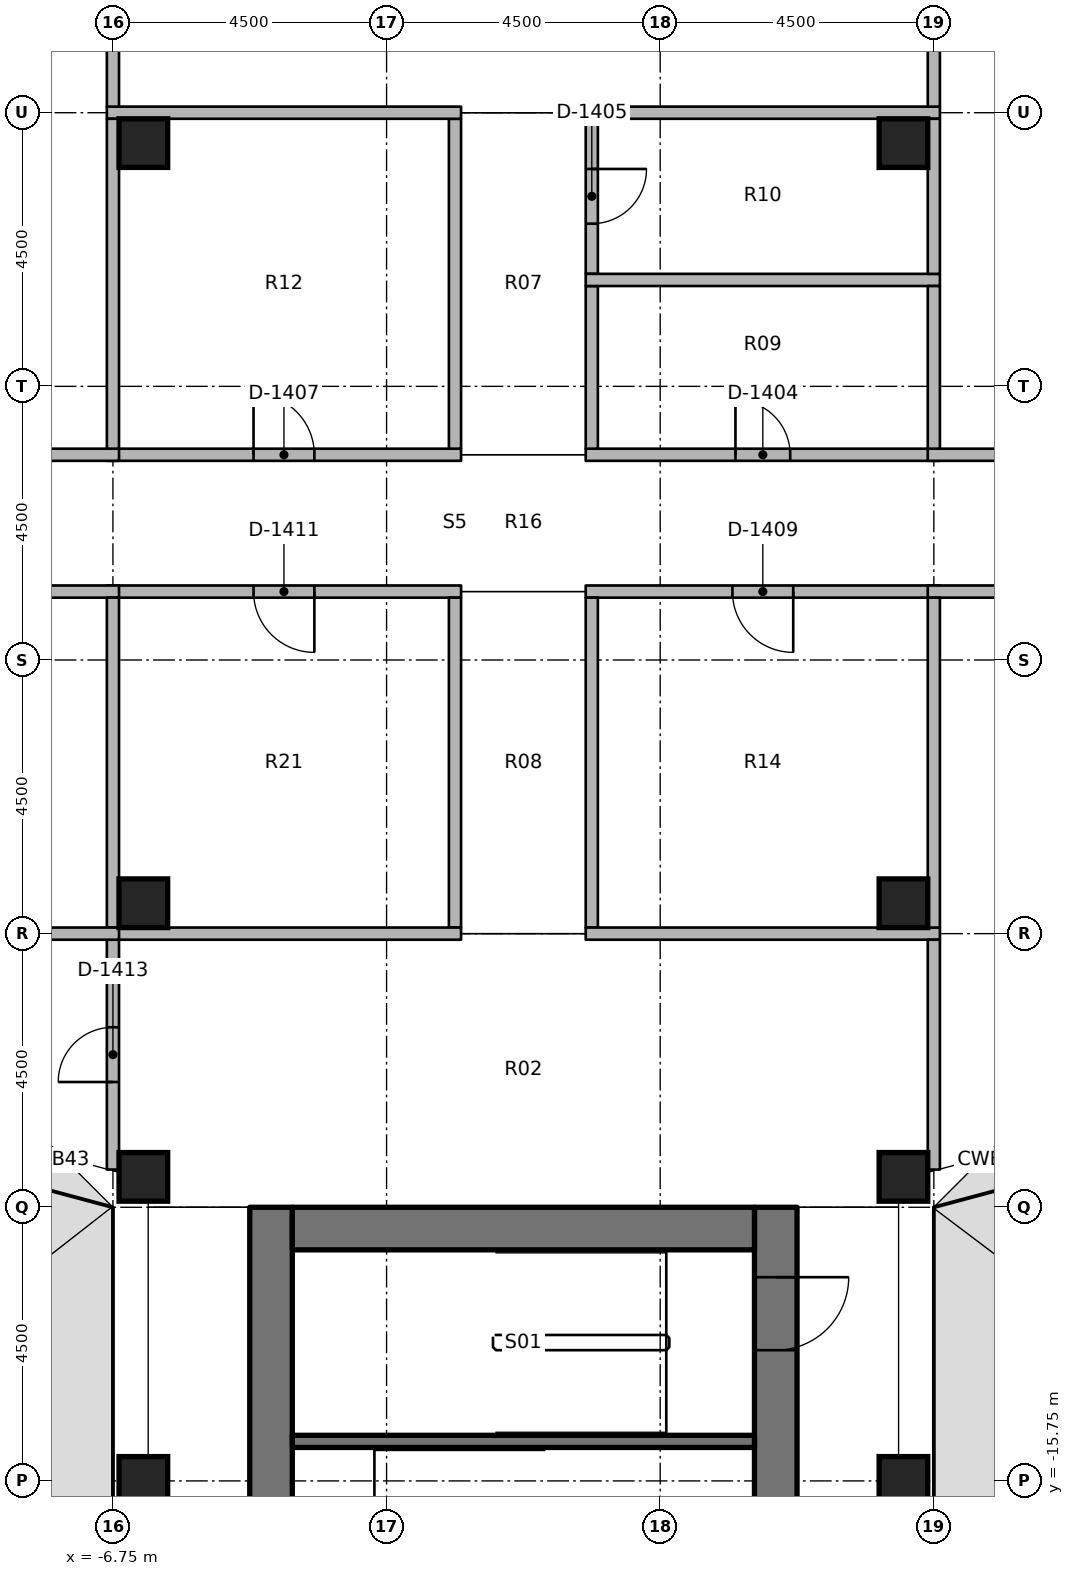
"""IFC4 building model, lengths in metres.
Left out: names, types, materials, properties, quantities, classifications, styles, units other than length and angle.
Written with IfcOpenShell. Run it as: python <this file> out.ifc"""

import sys

from ifc_helpers import new_model, si_unit, direction, frame, frame_2d, origin, origin_2d, place, context, subcontext, project, spatial, rectangle, extrude, element, fill, save


model = new_model("IFC4")
c1 = context("Model", 3, precision=1e-05, world=origin(), true_north=direction((0.0, 1.0)))
c2 = subcontext(c1, "Body", "Model", "MODEL_VIEW")
j1 = project(units=[si_unit("LENGTHUNIT", "METRE"), si_unit("PLANEANGLEUNIT", "RADIAN")], contexts=[c1])
p1 = place(None, origin())
s1 = spatial("IfcSite", under=j1, at=p1, CompositionType="ELEMENT")
p2 = place(p1, origin())
s2 = spatial("IfcBuilding", under=s1, at=p2, CompositionType="ELEMENT")
p3 = place(p2, frame((0.0, 0.0, 141.0)))
s3 = spatial("IfcBuildingStorey", under=s2, at=p3, CompositionType="ELEMENT", Elevation=141.0)
for number, where, z_axis, x_axis in (
    (1, (-6.25, -15.75, 0.0), (0.0, 0.0, 1.0), (1.0, 0.0, 0.0)),
    (2, (-6.25, -10.75, 0.0), (0.0, 0.0, 1.0), (1.0, 0.0, 0.0)),
    (3, (-6.25, -6.25, 0.0), (0.0, 0.0, 1.0), (1.0, 0.0, 0.0)),
    (4, (-6.25, 6.25, 0.0), (0.0, 0.0, 1.0), (1.0, 0.0, 0.0)),
    (5, (6.25, -15.75, 0.0), (0.0, 0.0, 1.0), (1.0, 0.0, 0.0)),
    (6, (6.25, -10.75, 0.0), (0.0, 0.0, 1.0), (1.0, 0.0, 0.0)),
    (7, (6.25, -6.25, 0.0), (0.0, 0.0, 1.0), (1.0, 0.0, 0.0)),
    (8, (6.25, 6.25, 0.0), (0.0, 0.0, 1.0), (1.0, 0.0, 0.0)),
):
    element("IfcColumn", number, at=place(p3, frame(where, z_axis=z_axis, x_axis=x_axis)), inside=s3, PredefinedType="COLUMN", context=c2, shape_type="SweptSolid", body=[
        extrude(rectangle(XDim=0.8, YDim=0.8, at=origin_2d()), origin(), (0.0, 0.0, 1.0), 3.65),
    ])
p4 = place(p3, frame((-4.15, -11.25, 0.0), z_axis=(0.0, 0.0, 1.0), x_axis=(0.0, -1.0, 0.0)))
e9 = element("IfcWall", 9, at=p4, inside=s3, PredefinedType="SHEAR", context=c2, shape_type="SweptSolid", body=[
    extrude(rectangle(XDim=15.0, YDim=0.7, at=frame_2d((7.5, 0.0))), origin(), (0.0, 0.0, 1.0), 3.8),
])
p5 = place(p4, frame((7.15, 0.0, 0.0)))
e10 = element("IfcOpeningElement", 10, at=p5, cuts=e9, PredefinedType="OPENING", context=c2, shape_type="SweptSolid", body=[
    extrude(rectangle(XDim=1.5, YDim=2.3, at=frame_2d((0.75, 1.15))), frame((0.0, 0.36, 0.0), z_axis=(0.0, -1.0, 0.0), x_axis=(1.0, 0.0, 0.0)), (0.0, 0.0, 1.0), 0.72),
])
p6 = place(p4, frame((5.55, 0.0, 0.0)))
e11 = element("IfcOpeningElement", 11, at=p6, cuts=e9, PredefinedType="OPENING", context=c2, shape_type="SweptSolid", body=[
    extrude(rectangle(XDim=1.2, YDim=2.1, at=frame_2d((0.6, 1.05))), frame((0.0, 0.36, 0.0), z_axis=(0.0, -1.0, 0.0), x_axis=(1.0, 0.0, 0.0)), (0.0, 0.0, 1.0), 0.72),
])
p7 = place(p3, frame((4.15, -11.25, 0.0), z_axis=(0.0, 0.0, 1.0), x_axis=(0.0, -1.0, 0.0)))
e12 = element("IfcWall", 12, at=p7, inside=s3, PredefinedType="SHEAR", context=c2, shape_type="SweptSolid", body=[
    extrude(rectangle(XDim=15.0, YDim=0.7, at=frame_2d((7.5, 0.0))), origin(), (0.0, 0.0, 1.0), 3.8),
])
p8 = place(p7, frame((7.15, 0.0, 0.0)))
e13 = element("IfcOpeningElement", 13, at=p8, cuts=e12, PredefinedType="OPENING", context=c2, shape_type="SweptSolid", body=[
    extrude(rectangle(XDim=1.5, YDim=2.3, at=frame_2d((0.75, 1.15))), frame((0.0, 0.36, 0.0), z_axis=(0.0, -1.0, 0.0), x_axis=(1.0, 0.0, 0.0)), (0.0, 0.0, 1.0), 0.72),
])
p9 = place(p7, frame((13.9, 0.0, 0.0)))
e14 = element("IfcOpeningElement", 14, at=p9, cuts=e12, PredefinedType="OPENING", context=c2, shape_type="SweptSolid", body=[
    extrude(rectangle(XDim=0.9, YDim=2.1, at=frame_2d((0.45, 1.05))), frame((0.0, 0.36, 0.0), z_axis=(0.0, -1.0, 0.0), x_axis=(1.0, 0.0, 0.0)), (0.0, 0.0, 1.0), 0.72),
])
p10 = place(p7, frame((1.15, 0.0, 0.0)))
e15 = element("IfcOpeningElement", 15, at=p10, cuts=e12, PredefinedType="OPENING", context=c2, shape_type="SweptSolid", body=[
    extrude(rectangle(XDim=1.2, YDim=2.1, at=frame_2d((0.6, 1.05))), frame((0.0, 0.36, 0.0), z_axis=(0.0, -1.0, 0.0), x_axis=(1.0, 0.0, 0.0)), (0.0, 0.0, 1.0), 0.72),
])
p11 = place(p3, frame((-3.8, -11.6, 0.0), z_axis=(0.0, 0.0, 1.0), x_axis=(1.0, 0.0, 0.0)))
e16 = element("IfcWall", 16, at=p11, inside=s3, PredefinedType="SHEAR", context=c2, shape_type="SweptSolid", body=[
    extrude(rectangle(XDim=7.6, YDim=0.7, at=frame_2d((3.8, 0.0))), origin(), (0.0, 0.0, 1.0), 3.8),
])
p12 = place(p3, frame((3.8, -15.1, 0.0), z_axis=(0.0, 0.0, 1.0), x_axis=(-1.0, 0.0, 0.0)))
e17 = element("IfcWall", 17, at=p12, inside=s3, PredefinedType="SHEAR", context=c2, shape_type="SweptSolid", body=[
    extrude(rectangle(XDim=7.6, YDim=0.2, at=frame_2d((3.8, 0.0))), origin(), (0.0, 0.0, 1.0), 3.65),
])
p13 = place(p3, frame((1.025, 1.125, 0.0), z_axis=(0.0, 0.0, 1.0), x_axis=(1.0, 0.0, 0.0)))
e18 = element("IfcWall", 18, at=p13, inside=s3, PredefinedType="PARTITIONING", context=c2, shape_type="SweptSolid", body=[
    extrude(rectangle(XDim=5.825, YDim=0.2, at=frame_2d((2.913, 0.0))), origin(), (0.0, 0.0, 1.0), 2.75),
])
p14 = place(p13, frame((2.462, 0.0, 0.0)))
e19 = element("IfcOpeningElement", 19, at=p14, cuts=e18, PredefinedType="OPENING", context=c2, shape_type="SweptSolid", body=[
    extrude(rectangle(XDim=0.9, YDim=2.1, at=frame_2d((0.45, 1.05))), frame((0.0, 0.11, 0.0), z_axis=(0.0, -1.0, 0.0), x_axis=(1.0, 0.0, 0.0)), (0.0, 0.0, 1.0), 0.22),
])
p15 = place(p3, frame((6.65, 1.125, 0.0), z_axis=(0.0, 0.0, 1.0), x_axis=(1.0, 0.0, 0.0)))
e20 = element("IfcWall", 20, at=p15, inside=s3, PredefinedType="PARTITIONING", context=c2, shape_type="SweptSolid", body=[
    extrude(rectangle(XDim=4.7, YDim=0.2, at=frame_2d((2.35, 0.0))), origin(), (0.0, 0.0, 1.0), 2.75),
])
p16 = place(p15, frame((1.85, 0.0, 0.0)))
e21 = element("IfcOpeningElement", 21, at=p16, cuts=e20, PredefinedType="OPENING", context=c2, shape_type="SweptSolid", body=[
    extrude(rectangle(XDim=1.0, YDim=2.1, at=frame_2d((0.5, 1.05))), frame((0.0, 0.11, 0.0), z_axis=(0.0, -1.0, 0.0), x_axis=(1.0, 0.0, 0.0)), (0.0, 0.0, 1.0), 0.22),
])
p17 = place(p3, frame((-6.85, 1.125, 0.0), z_axis=(0.0, 0.0, 1.0), x_axis=(1.0, 0.0, 0.0)))
e22 = element("IfcWall", 22, at=p17, inside=s3, PredefinedType="PARTITIONING", context=c2, shape_type="SweptSolid", body=[
    extrude(rectangle(XDim=5.825, YDim=0.2, at=frame_2d((2.913, 0.0))), origin(), (0.0, 0.0, 1.0), 2.75),
])
p18 = place(p17, frame((2.413, 0.0, 0.0)))
e23 = element("IfcOpeningElement", 23, at=p18, cuts=e22, PredefinedType="OPENING", context=c2, shape_type="SweptSolid", body=[
    extrude(rectangle(XDim=1.0, YDim=2.1, at=frame_2d((0.5, 1.05))), frame((0.0, 0.11, 0.0), z_axis=(0.0, -1.0, 0.0), x_axis=(1.0, 0.0, 0.0)), (0.0, 0.0, 1.0), 0.22),
])
p19 = place(p3, frame((-11.35, 1.125, 0.0), z_axis=(0.0, 0.0, 1.0), x_axis=(1.0, 0.0, 0.0)))
e24 = element("IfcWall", 24, at=p19, inside=s3, PredefinedType="PARTITIONING", context=c2, shape_type="SweptSolid", body=[
    extrude(rectangle(XDim=4.7, YDim=0.2, at=frame_2d((2.35, 0.0))), origin(), (0.0, 0.0, 1.0), 2.75),
])
p20 = place(p19, frame((1.85, 0.0, 0.0)))
e25 = element("IfcOpeningElement", 25, at=p20, cuts=e24, PredefinedType="OPENING", context=c2, shape_type="SweptSolid", body=[
    extrude(rectangle(XDim=1.0, YDim=2.1, at=frame_2d((0.5, 1.05))), frame((0.0, 0.11, 0.0), z_axis=(0.0, -1.0, 0.0), x_axis=(1.0, 0.0, 0.0)), (0.0, 0.0, 1.0), 0.22),
])
p21 = place(p3, frame((6.85, -1.125, 0.0), z_axis=(0.0, 0.0, 1.0), x_axis=(-1.0, 0.0, 0.0)))
e26 = element("IfcWall", 26, at=p21, inside=s3, PredefinedType="PARTITIONING", context=c2, shape_type="SweptSolid", body=[
    extrude(rectangle(XDim=5.825, YDim=0.2, at=frame_2d((2.913, 0.0))), origin(), (0.0, 0.0, 1.0), 2.75),
])
p22 = place(p21, frame((2.413, 0.0, 0.0)))
e27 = element("IfcOpeningElement", 27, at=p22, cuts=e26, PredefinedType="OPENING", context=c2, shape_type="SweptSolid", body=[
    extrude(rectangle(XDim=1.0, YDim=2.1, at=frame_2d((0.5, 1.05))), frame((0.0, 0.11, 0.0), z_axis=(0.0, -1.0, 0.0), x_axis=(1.0, 0.0, 0.0)), (0.0, 0.0, 1.0), 0.22),
])
p23 = place(p3, frame((11.35, -1.125, 0.0), z_axis=(0.0, 0.0, 1.0), x_axis=(-1.0, 0.0, 0.0)))
e28 = element("IfcWall", 28, at=p23, inside=s3, PredefinedType="PARTITIONING", context=c2, shape_type="SweptSolid", body=[
    extrude(rectangle(XDim=4.7, YDim=0.2, at=frame_2d((2.35, 0.0))), origin(), (0.0, 0.0, 1.0), 2.75),
])
p24 = place(p23, frame((1.85, 0.0, 0.0)))
e29 = element("IfcOpeningElement", 29, at=p24, cuts=e28, PredefinedType="OPENING", context=c2, shape_type="SweptSolid", body=[
    extrude(rectangle(XDim=1.0, YDim=2.1, at=frame_2d((0.5, 1.05))), frame((0.0, 0.11, 0.0), z_axis=(0.0, -1.0, 0.0), x_axis=(1.0, 0.0, 0.0)), (0.0, 0.0, 1.0), 0.22),
])
p25 = place(p3, frame((-1.025, -1.125, 0.0), z_axis=(0.0, 0.0, 1.0), x_axis=(-1.0, 0.0, 0.0)))
e30 = element("IfcWall", 30, at=p25, inside=s3, PredefinedType="PARTITIONING", context=c2, shape_type="SweptSolid", body=[
    extrude(rectangle(XDim=5.825, YDim=0.2, at=frame_2d((2.913, 0.0))), origin(), (0.0, 0.0, 1.0), 2.75),
])
p26 = place(p25, frame((2.413, 0.0, 0.0)))
e31 = element("IfcOpeningElement", 31, at=p26, cuts=e30, PredefinedType="OPENING", context=c2, shape_type="SweptSolid", body=[
    extrude(rectangle(XDim=1.0, YDim=2.1, at=frame_2d((0.5, 1.05))), frame((0.0, 0.11, 0.0), z_axis=(0.0, -1.0, 0.0), x_axis=(1.0, 0.0, 0.0)), (0.0, 0.0, 1.0), 0.22),
])
p27 = place(p3, frame((-6.65, -1.125, 0.0), z_axis=(0.0, 0.0, 1.0), x_axis=(-1.0, 0.0, 0.0)))
e32 = element("IfcWall", 32, at=p27, inside=s3, PredefinedType="PARTITIONING", context=c2, shape_type="SweptSolid", body=[
    extrude(rectangle(XDim=4.7, YDim=0.2, at=frame_2d((2.35, 0.0))), origin(), (0.0, 0.0, 1.0), 2.75),
])
p28 = place(p27, frame((1.85, 0.0, 0.0)))
e33 = element("IfcOpeningElement", 33, at=p28, cuts=e32, PredefinedType="OPENING", context=c2, shape_type="SweptSolid", body=[
    extrude(rectangle(XDim=1.0, YDim=2.1, at=frame_2d((0.5, 1.05))), frame((0.0, 0.11, 0.0), z_axis=(0.0, -1.0, 0.0), x_axis=(1.0, 0.0, 0.0)), (0.0, 0.0, 1.0), 0.22),
])
p29 = place(p3, frame((1.125, 1.225, 0.0), z_axis=(0.0, 0.0, 1.0), x_axis=(0.0, 1.0, 0.0)))
e34 = element("IfcWall", 34, at=p29, inside=s3, PredefinedType="PARTITIONING", context=c2, shape_type="SweptSolid", body=[
    extrude(rectangle(XDim=2.675, YDim=0.2, at=frame_2d((1.337, 0.0))), origin(), (0.0, 0.0, 1.0), 2.75),
])
p30 = place(p3, frame((1.125, 6.65, 0.0), z_axis=(0.0, 0.0, 1.0), x_axis=(0.0, -1.0, 0.0)))
e35 = element("IfcWall", 35, at=p30, inside=s3, PredefinedType="PARTITIONING", context=c2, shape_type="SweptSolid", body=[
    extrude(rectangle(XDim=2.55, YDim=0.2, at=frame_2d((1.275, 0.0))), origin(), (0.0, 0.0, 1.0), 2.75),
])
p31 = place(p30, frame((0.825, 0.0, 0.0)))
e36 = element("IfcOpeningElement", 36, at=p31, cuts=e35, PredefinedType="OPENING", context=c2, shape_type="SweptSolid", body=[
    extrude(rectangle(XDim=0.9, YDim=2.1, at=frame_2d((0.45, 1.05))), frame((0.0, 0.11, 0.0), z_axis=(0.0, -1.0, 0.0), x_axis=(1.0, 0.0, 0.0)), (0.0, 0.0, 1.0), 0.22),
])
for number, where, z_axis, x_axis in (
    (37, (-1.125, 1.225, 0.0), (0.0, 0.0, 1.0), (0.0, 1.0, 0.0)),
    (38, (1.125, -6.65, 0.0), (0.0, 0.0, 1.0), (0.0, 1.0, 0.0)),
    (39, (-1.125, -6.65, 0.0), (0.0, 0.0, 1.0), (0.0, 1.0, 0.0)),
):
    element("IfcWall", number, at=place(p3, frame(where, z_axis=z_axis, x_axis=x_axis)), inside=s3, PredefinedType="PARTITIONING", context=c2, shape_type="SweptSolid", body=[
        extrude(rectangle(XDim=5.425, YDim=0.2, at=frame_2d((2.712, 0.0))), origin(), (0.0, 0.0, 1.0), 2.75),
    ])
p32 = place(p3, frame((1.025, 6.75, 0.0), z_axis=(0.0, 0.0, 1.0), x_axis=(1.0, 0.0, 0.0)))
e40 = element("IfcWall", 40, at=p32, inside=s3, PredefinedType="PARTITIONING", context=c2, shape_type="SweptSolid", body=[
    extrude(rectangle(XDim=5.825, YDim=0.2, at=frame_2d((2.913, 0.0))), origin(), (0.0, 0.0, 1.0), 2.75),
])
p33 = place(p3, frame((6.75, 6.85, 0.0), z_axis=(0.0, 0.0, 1.0), x_axis=(0.0, 1.0, 0.0)))
e41 = element("IfcWall", 41, at=p33, inside=s3, PredefinedType="PARTITIONING", context=c2, shape_type="SweptSolid", body=[
    extrude(rectangle(XDim=3.78, YDim=0.2, at=frame_2d((1.89, 0.0))), origin(), (0.0, 0.0, 1.0), 2.75),
])
p34 = place(p3, frame((-6.85, 6.75, 0.0), z_axis=(0.0, 0.0, 1.0), x_axis=(1.0, 0.0, 0.0)))
e42 = element("IfcWall", 42, at=p34, inside=s3, PredefinedType="PARTITIONING", context=c2, shape_type="SweptSolid", body=[
    extrude(rectangle(XDim=5.825, YDim=0.2, at=frame_2d((2.913, 0.0))), origin(), (0.0, 0.0, 1.0), 2.75),
])
p35 = place(p3, frame((-6.75, 6.85, 0.0), z_axis=(0.0, 0.0, 1.0), x_axis=(0.0, 1.0, 0.0)))
e43 = element("IfcWall", 43, at=p35, inside=s3, PredefinedType="PARTITIONING", context=c2, shape_type="SweptSolid", body=[
    extrude(rectangle(XDim=3.78, YDim=0.2, at=frame_2d((1.89, 0.0))), origin(), (0.0, 0.0, 1.0), 2.75),
])
p36 = place(p3, frame((1.025, -6.75, 0.0), z_axis=(0.0, 0.0, 1.0), x_axis=(1.0, 0.0, 0.0)))
e44 = element("IfcWall", 44, at=p36, inside=s3, PredefinedType="PARTITIONING", context=c2, shape_type="SweptSolid", body=[
    extrude(rectangle(XDim=5.825, YDim=0.2, at=frame_2d((2.913, 0.0))), origin(), (0.0, 0.0, 1.0), 2.75),
])
p37 = place(p3, frame((6.75, -10.63, 0.0), z_axis=(0.0, 0.0, 1.0), x_axis=(0.0, 1.0, 0.0)))
e45 = element("IfcWall", 45, at=p37, inside=s3, PredefinedType="PARTITIONING", context=c2, shape_type="SweptSolid", body=[
    extrude(rectangle(XDim=3.78, YDim=0.2, at=frame_2d((1.89, 0.0))), origin(), (0.0, 0.0, 1.0), 2.75),
])
p38 = place(p3, frame((-6.85, -6.75, 0.0), z_axis=(0.0, 0.0, 1.0), x_axis=(1.0, 0.0, 0.0)))
e46 = element("IfcWall", 46, at=p38, inside=s3, PredefinedType="PARTITIONING", context=c2, shape_type="SweptSolid", body=[
    extrude(rectangle(XDim=5.825, YDim=0.2, at=frame_2d((2.913, 0.0))), origin(), (0.0, 0.0, 1.0), 2.75),
])
p39 = place(p3, frame((-6.75, -10.63, 0.0), z_axis=(0.0, 0.0, 1.0), x_axis=(0.0, 1.0, 0.0)))
e47 = element("IfcWall", 47, at=p39, inside=s3, PredefinedType="PARTITIONING", context=c2, shape_type="SweptSolid", body=[
    extrude(rectangle(XDim=3.78, YDim=0.2, at=frame_2d((1.89, 0.0))), origin(), (0.0, 0.0, 1.0), 2.75),
])
p40 = place(p39, frame((1.44, 0.0, 0.0)))
e48 = element("IfcOpeningElement", 48, at=p40, cuts=e47, PredefinedType="OPENING", context=c2, shape_type="SweptSolid", body=[
    extrude(rectangle(XDim=0.9, YDim=2.1, at=frame_2d((0.45, 1.05))), frame((0.0, 0.11, 0.0), z_axis=(0.0, -1.0, 0.0), x_axis=(1.0, 0.0, 0.0)), (0.0, 0.0, 1.0), 0.22),
])
p41 = place(p3, frame((1.025, 4.0, 0.0), z_axis=(0.0, 0.0, 1.0), x_axis=(1.0, 0.0, 0.0)))
e49 = element("IfcWall", 49, at=p41, inside=s3, PredefinedType="PARTITIONING", context=c2, shape_type="SweptSolid", body=[
    extrude(rectangle(XDim=5.825, YDim=0.2, at=frame_2d((2.913, 0.0))), origin(), (0.0, 0.0, 1.0), 2.75),
])
p42 = place(p3, frame((6.75, 1.225, 0.0), z_axis=(0.0, 0.0, 1.0), x_axis=(0.0, 1.0, 0.0)))
e50 = element("IfcWall", 50, at=p42, inside=s3, PredefinedType="PARTITIONING", context=c2, shape_type="SweptSolid", body=[
    extrude(rectangle(XDim=2.675, YDim=0.2, at=frame_2d((1.337, 0.0))), origin(), (0.0, 0.0, 1.0), 2.75),
])
p43 = place(p3, frame((6.75, 4.1, 0.0), z_axis=(0.0, 0.0, 1.0), x_axis=(0.0, 1.0, 0.0)))
e51 = element("IfcWall", 51, at=p43, inside=s3, PredefinedType="PARTITIONING", context=c2, shape_type="SweptSolid", body=[
    extrude(rectangle(XDim=2.55, YDim=0.2, at=frame_2d((1.275, 0.0))), origin(), (0.0, 0.0, 1.0), 2.75),
])
for number, where, z_axis, x_axis in (
    (52, (-6.75, 1.225, 0.0), (0.0, 0.0, 1.0), (0.0, 1.0, 0.0)),
    (53, (6.75, -6.65, 0.0), (0.0, 0.0, 1.0), (0.0, 1.0, 0.0)),
    (54, (-6.75, -6.65, 0.0), (0.0, 0.0, 1.0), (0.0, 1.0, 0.0)),
):
    element("IfcWall", number, at=place(p3, frame(where, z_axis=z_axis, x_axis=x_axis)), inside=s3, PredefinedType="PARTITIONING", context=c2, shape_type="SweptSolid", body=[
        extrude(rectangle(XDim=5.425, YDim=0.2, at=frame_2d((2.712, 0.0))), origin(), (0.0, 0.0, 1.0), 2.75),
    ])
p44 = place(p3, frame((-11.35, -6.75, 0.0), z_axis=(0.0, 0.0, 1.0), x_axis=(1.0, 0.0, 0.0)))
e55 = element("IfcWall", 55, at=p44, inside=s3, PredefinedType="PARTITIONING", context=c2, shape_type="SweptSolid", body=[
    extrude(rectangle(XDim=4.7, YDim=0.2, at=frame_2d((2.35, 0.0))), origin(), (0.0, 0.0, 1.0), 2.75),
])
p45 = place(p10, origin())
e56 = element("IfcDoor", 56, at=p45, inside=s3, OperationType="SINGLE_SWING_LEFT", PredefinedType="DOOR", context=c2, shape_type="SweptSolid", body=[
    extrude(rectangle(XDim=1.2, YDim=2.1, at=frame_2d((0.6, 1.05))), frame((0.0, 0.025, 0.0), z_axis=(0.0, -1.0, 0.0), x_axis=(1.0, 0.0, 0.0)), (0.0, 0.0, 1.0), 0.05),
])
fill(e15, e56)
p46 = place(p14, origin())
e57 = element("IfcDoor", 57, at=p46, inside=s3, OperationType="SINGLE_SWING_RIGHT", PredefinedType="DOOR", context=c2, shape_type="SweptSolid", body=[
    extrude(rectangle(XDim=0.9, YDim=2.1, at=frame_2d((0.45, 1.05))), frame((0.0, 0.025, 0.0), z_axis=(0.0, -1.0, 0.0), x_axis=(1.0, 0.0, 0.0)), (0.0, 0.0, 1.0), 0.05),
])
fill(e19, e57)
p47 = place(p31, origin())
e58 = element("IfcDoor", 58, at=p47, inside=s3, OperationType="SINGLE_SWING_RIGHT", PredefinedType="DOOR", context=c2, shape_type="SweptSolid", body=[
    extrude(rectangle(XDim=0.9, YDim=2.1, at=frame_2d((0.45, 1.05))), frame((0.0, 0.025, 0.0), z_axis=(0.0, -1.0, 0.0), x_axis=(1.0, 0.0, 0.0)), (0.0, 0.0, 1.0), 0.05),
])
fill(e36, e58)
p48 = place(p18, origin())
e59 = element("IfcDoor", 59, at=p48, inside=s3, OperationType="SINGLE_SWING_RIGHT", PredefinedType="DOOR", context=c2, shape_type="SweptSolid", body=[
    extrude(rectangle(XDim=1.0, YDim=2.1, at=frame_2d((0.5, 1.05))), frame((0.0, 0.025, 0.0), z_axis=(0.0, -1.0, 0.0), x_axis=(1.0, 0.0, 0.0)), (0.0, 0.0, 1.0), 0.05),
])
fill(e23, e59)
p49 = place(p22, origin())
e60 = element("IfcDoor", 60, at=p49, inside=s3, OperationType="SINGLE_SWING_RIGHT", PredefinedType="DOOR", context=c2, shape_type="SweptSolid", body=[
    extrude(rectangle(XDim=1.0, YDim=2.1, at=frame_2d((0.5, 1.05))), frame((0.0, 0.025, 0.0), z_axis=(0.0, -1.0, 0.0), x_axis=(1.0, 0.0, 0.0)), (0.0, 0.0, 1.0), 0.05),
])
fill(e27, e60)
p50 = place(p26, origin())
e61 = element("IfcDoor", 61, at=p50, inside=s3, OperationType="SINGLE_SWING_RIGHT", PredefinedType="DOOR", context=c2, shape_type="SweptSolid", body=[
    extrude(rectangle(XDim=1.0, YDim=2.1, at=frame_2d((0.5, 1.05))), frame((0.0, 0.025, 0.0), z_axis=(0.0, -1.0, 0.0), x_axis=(1.0, 0.0, 0.0)), (0.0, 0.0, 1.0), 0.05),
])
fill(e31, e61)
p51 = place(p40, origin())
e62 = element("IfcDoor", 62, at=p51, inside=s3, OperationType="SINGLE_SWING_RIGHT", PredefinedType="DOOR", context=c2, shape_type="SweptSolid", body=[
    extrude(rectangle(XDim=0.9, YDim=2.1, at=frame_2d((0.45, 1.05))), frame((0.0, 0.025, 0.0), z_axis=(0.0, -1.0, 0.0), x_axis=(1.0, 0.0, 0.0)), (0.0, 0.0, 1.0), 0.05),
])
fill(e48, e62)
save(model, sys.argv[1])
